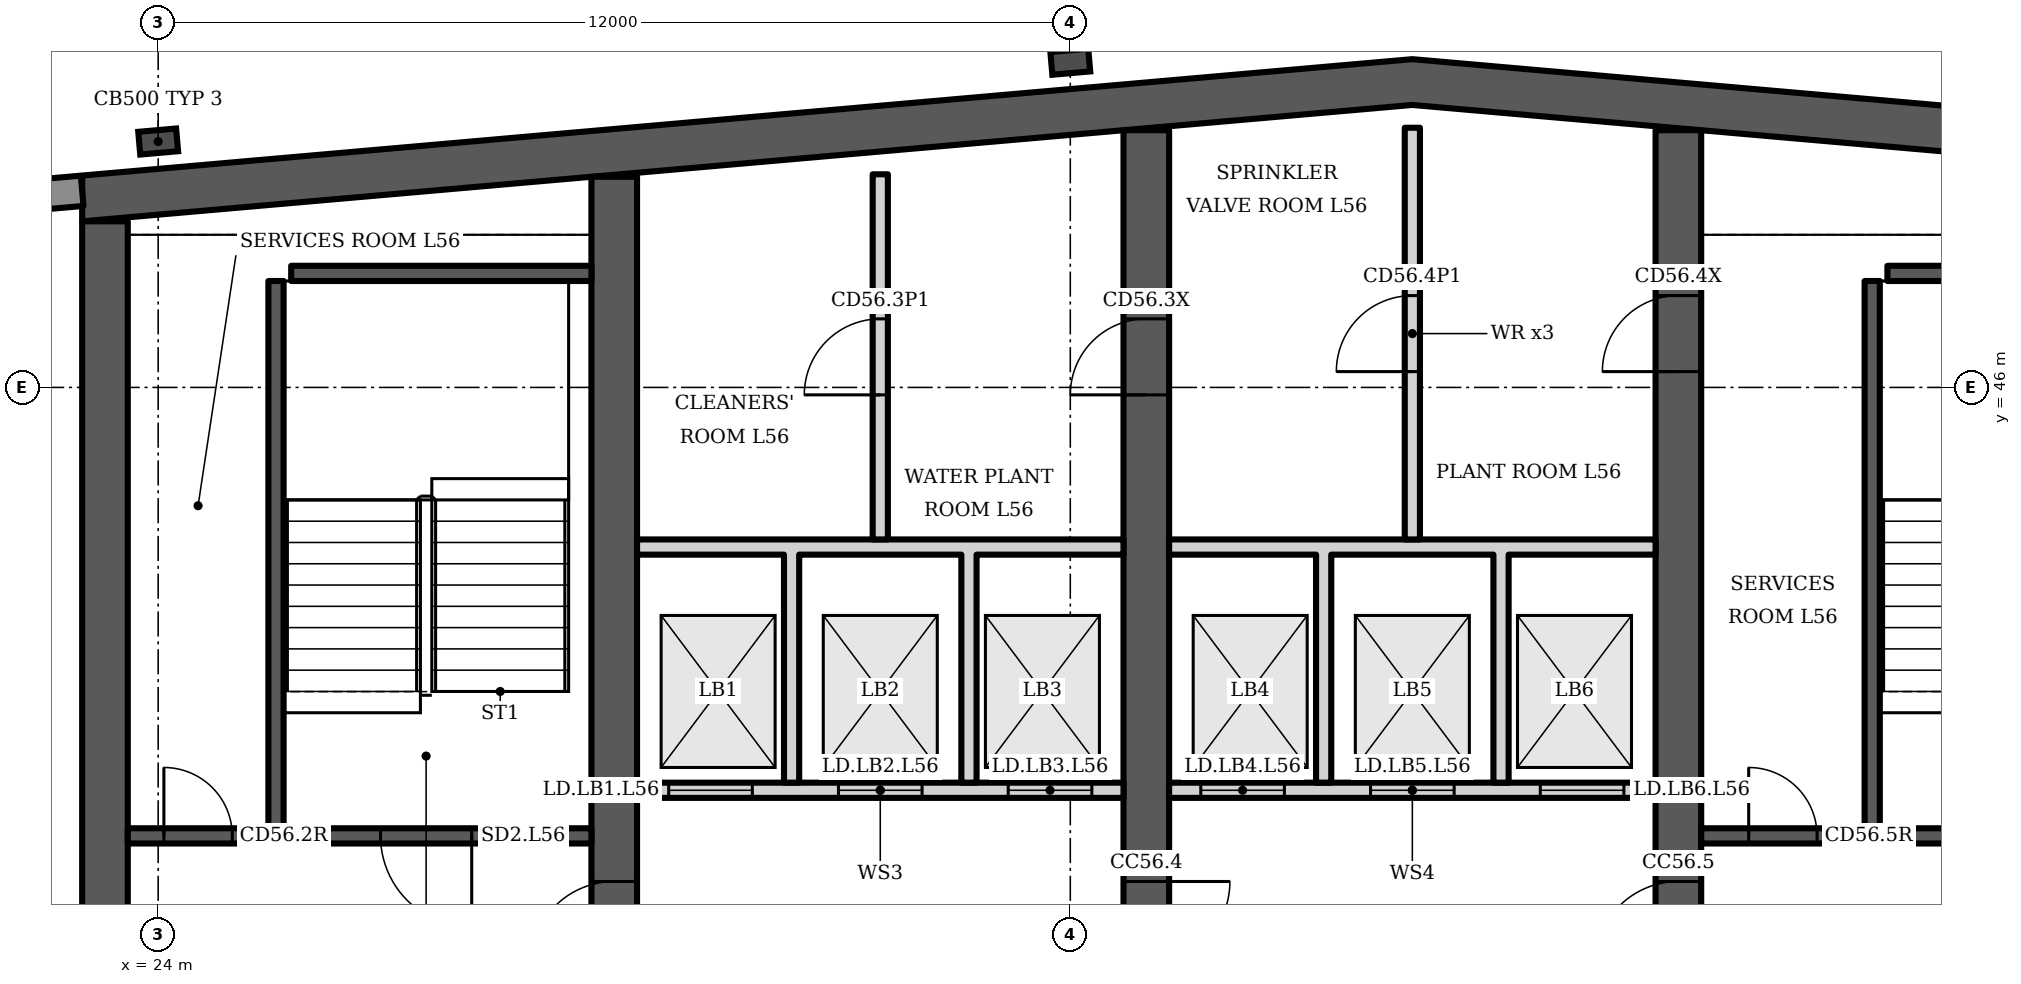
"""IFC4 building model, lengths in metres.
Left out: names, types, materials, properties, quantities, classifications, styles, units other than length and angle.
Written with IfcOpenShell. Run it as: python <this file> out.ifc"""

import sys

from ifc_helpers import new_model, si_unit, direction, frame, frame_2d, origin, origin_2d, place, context, subcontext, project, spatial, polyline, rectangle, i_section, outline, extrude, element, fill, save


model = new_model("IFC4")
c1 = context("Model", 3, precision=1e-05, world=origin(), true_north=direction((0.0, 1.0)))
c2 = subcontext(c1, "Body", "Model", "MODEL_VIEW")
j1 = project(units=[si_unit("LENGTHUNIT", "METRE"), si_unit("PLANEANGLEUNIT", "RADIAN")], contexts=[c1])
p1 = place(None, origin())
s1 = spatial("IfcSite", under=j1, at=p1, CompositionType="ELEMENT")
p2 = place(p1, origin())
s2 = spatial("IfcBuilding", under=s1, at=p2, CompositionType="ELEMENT")
p3 = place(p2, frame((0.0, 0.0, 225.1)))
s3 = spatial("IfcBuildingStorey", under=s2, at=p3, CompositionType="ELEMENT", Elevation=225.1)
p4 = place(p3, frame((0.0, 0.0, -0.0)))
e1 = element("IfcWall", 1, at=p4, inside=s3, PredefinedType="SHEAR", context=c2, shape_type="SweptSolid", body=[
    extrude(outline(polyline([(23.0, 48.185), (40.5, 49.716), (58.0, 48.185), (58.0, 48.787), (40.5, 50.318), (23.0, 48.787), (23.0, 48.185)])), origin(), (0.0, 0.0, 1.0), 3.6),
])
p5 = place(p3, frame((23.3, 34.6, 0.0), z_axis=(0.0, 0.0, 1.0), x_axis=(0.0, 1.0, 0.0)))
e2 = element("IfcWall", 2, at=p5, inside=s3, PredefinedType="SHEAR", context=c2, shape_type="SweptSolid", body=[
    extrude(rectangle(XDim=13.585, YDim=0.6, at=frame_2d((6.792, 0.0))), origin(), (0.0, 0.0, 1.0), 3.6),
])
p6 = place(p3, frame((30.0, 34.6, 0.0), z_axis=(0.0, 0.0, 1.0), x_axis=(0.0, 1.0, 0.0)))
e3 = element("IfcWall", 3, at=p6, inside=s3, PredefinedType="SHEAR", context=c2, shape_type="SweptSolid", body=[
    extrude(rectangle(XDim=14.171, YDim=0.6, at=frame_2d((7.085, 0.0))), origin(), (0.0, 0.0, 1.0), 3.6),
])
p7 = place(p6, frame((3.8, 0.0, 0.0)))
e4 = element("IfcOpeningElement", 4, at=p7, cuts=e3, PredefinedType="OPENING", context=c2, shape_type="SweptSolid", body=[
    extrude(rectangle(XDim=1.1, YDim=2.1, at=frame_2d((0.55, 1.05))), frame((0.0, 0.31, 0.0), z_axis=(0.0, -1.0, 0.0), x_axis=(1.0, 0.0, 0.0)), (0.0, 0.0, 1.0), 0.62),
])
p8 = place(p3, frame((37.0, 34.6, 0.0), z_axis=(0.0, 0.0, 1.0), x_axis=(0.0, 1.0, 0.0)))
e5 = element("IfcWall", 5, at=p8, inside=s3, PredefinedType="SHEAR", context=c2, shape_type="SweptSolid", body=[
    extrude(rectangle(XDim=14.784, YDim=0.6, at=frame_2d((7.392, 0.0))), origin(), (0.0, 0.0, 1.0), 3.6),
])
p9 = place(p8, frame((11.302, 0.0, 0.0)))
e6 = element("IfcOpeningElement", 6, at=p9, cuts=e5, PredefinedType="OPENING", context=c2, shape_type="SweptSolid", body=[
    extrude(rectangle(XDim=1.0, YDim=2.1, at=frame_2d((0.5, 1.05))), frame((0.0, 0.31, 0.0), z_axis=(0.0, -1.0, 0.0), x_axis=(1.0, 0.0, 0.0)), (0.0, 0.0, 1.0), 0.62),
])
p10 = place(p8, frame((3.8, 0.0, 0.0)))
e7 = element("IfcOpeningElement", 7, at=p10, cuts=e5, PredefinedType="OPENING", context=c2, shape_type="SweptSolid", body=[
    extrude(rectangle(XDim=1.1, YDim=2.1, at=frame_2d((0.55, 1.05))), frame((0.0, 0.31, 0.0), z_axis=(0.0, -1.0, 0.0), x_axis=(1.0, 0.0, 0.0)), (0.0, 0.0, 1.0), 0.62),
])
p11 = place(p3, frame((44.0, 34.6, 0.0), z_axis=(0.0, 0.0, 1.0), x_axis=(0.0, 1.0, 0.0)))
e8 = element("IfcWall", 8, at=p11, inside=s3, PredefinedType="SHEAR", context=c2, shape_type="SweptSolid", body=[
    extrude(rectangle(XDim=14.784, YDim=0.6, at=frame_2d((7.392, 0.0))), origin(), (0.0, 0.0, 1.0), 3.6),
])
p12 = place(p11, frame((11.608, 0.0, 0.0)))
e9 = element("IfcOpeningElement", 9, at=p12, cuts=e8, PredefinedType="OPENING", context=c2, shape_type="SweptSolid", body=[
    extrude(rectangle(XDim=1.0, YDim=2.1, at=frame_2d((0.5, 1.05))), frame((0.0, 0.31, 0.0), z_axis=(0.0, -1.0, 0.0), x_axis=(1.0, 0.0, 0.0)), (0.0, 0.0, 1.0), 0.62),
])
p13 = place(p11, frame((3.8, 0.0, 0.0)))
e10 = element("IfcOpeningElement", 10, at=p13, cuts=e8, PredefinedType="OPENING", context=c2, shape_type="SweptSolid", body=[
    extrude(rectangle(XDim=1.1, YDim=2.1, at=frame_2d((0.55, 1.05))), frame((0.0, 0.31, 0.0), z_axis=(0.0, -1.0, 0.0), x_axis=(1.0, 0.0, 0.0)), (0.0, 0.0, 1.0), 0.62),
])
for number, where, z_axis, x_axis in (
    (11, (24.0, 49.235, 0.0), (0.0, 0.0, 1.0), (-0.087, 0.996, 0.0)),
    (12, (36.0, 50.285, 0.0), (0.0, 0.0, 1.0), (-0.087, 0.996, 0.0)),
):
    element("IfcColumn", number, at=place(p3, frame(where, z_axis=z_axis, x_axis=x_axis)), inside=s3, PredefinedType="COLUMN", context=c2, shape_type="SweptSolid", body=[
        extrude(i_section(OverallWidth=0.3, OverallDepth=0.5, WebThickness=0.014, FlangeThickness=0.028, FilletRadius=0.027, at=origin_2d()), origin(), (0.0, 0.0, 1.0), 3.6),
    ])
p14 = place(p3, frame((23.0, 48.587, 0.0), z_axis=(0.0, 0.0, 1.0), x_axis=(-0.996194, -0.087168, 0.0)))
e13 = element("IfcWall", 13, at=p14, inside=s3, PredefinedType="SOLIDWALL", context=c2, shape_type="SweptSolid", body=[
    extrude(rectangle(XDim=2.994, YDim=0.4, at=frame_2d((1.497, 0.0))), origin(), (0.0, 0.0, 1.0), 3.2),
])
p15 = place(p3, frame((23.6, 40.1, 0.0), z_axis=(0.0, 0.0, 1.0), x_axis=(1.0, 0.0, 0.0)))
e14 = element("IfcWall", 14, at=p15, inside=s3, PredefinedType="SHEAR", context=c2, shape_type="SweptSolid", body=[
    extrude(rectangle(XDim=6.1, YDim=0.2, at=frame_2d((3.05, 0.0))), origin(), (0.0, 0.0, 1.0), 3.2),
])
p16 = place(p15, frame((3.325, 0.0, 0.0)))
e15 = element("IfcOpeningElement", 15, at=p16, cuts=e14, PredefinedType="OPENING", context=c2, shape_type="SweptSolid", body=[
    extrude(rectangle(XDim=1.2, YDim=2.1, at=frame_2d((0.6, 1.05))), frame((0.0, 0.11, 0.0), z_axis=(0.0, -1.0, 0.0), x_axis=(1.0, 0.0, 0.0)), (0.0, 0.0, 1.0), 0.22),
])
p17 = place(p15, frame((0.475, 0.0, 0.0)))
e16 = element("IfcOpeningElement", 16, at=p17, cuts=e14, PredefinedType="OPENING", context=c2, shape_type="SweptSolid", body=[
    extrude(rectangle(XDim=0.9, YDim=2.1, at=frame_2d((0.45, 1.05))), frame((0.0, 0.11, 0.0), z_axis=(0.0, -1.0, 0.0), x_axis=(1.0, 0.0, 0.0)), (0.0, 0.0, 1.0), 0.22),
])
p18 = place(p3, frame((25.55, 40.2, 0.0), z_axis=(0.0, 0.0, 1.0), x_axis=(0.0, 1.0, 0.0)))
e17 = element("IfcWall", 17, at=p18, inside=s3, PredefinedType="SHEAR", context=c2, shape_type="SweptSolid", body=[
    extrude(rectangle(XDim=7.2, YDim=0.2, at=frame_2d((3.6, 0.0))), origin(), (0.0, 0.0, 1.0), 3.2),
])
p19 = place(p3, frame((25.75, 47.5, 0.0), z_axis=(0.0, 0.0, 1.0), x_axis=(1.0, 0.0, 0.0)))
e18 = element("IfcWall", 18, at=p19, inside=s3, PredefinedType="SHEAR", context=c2, shape_type="SweptSolid", body=[
    extrude(rectangle(XDim=3.95, YDim=0.2, at=frame_2d((1.975, 0.0))), origin(), (0.0, 0.0, 1.0), 3.2),
])
p20 = place(p3, frame((30.3, 40.7, 0.0), z_axis=(0.0, 0.0, 1.0), x_axis=(1.0, 0.0, 0.0)))
e19 = element("IfcWall", 19, at=p20, inside=s3, PredefinedType="PARTITIONING", context=c2, shape_type="SweptSolid", body=[
    extrude(rectangle(XDim=6.4, YDim=0.2, at=frame_2d((3.2, 0.0))), origin(), (0.0, 0.0, 1.0), 3.2),
])
p21 = place(p20, frame((0.417, 0.0, 0.0)))
e20 = element("IfcOpeningElement", 20, at=p21, cuts=e19, PredefinedType="OPENING", context=c2, shape_type="SweptSolid", body=[
    extrude(rectangle(XDim=1.1, YDim=2.1, at=frame_2d((0.55, 1.05))), frame((0.0, 0.11, 0.0), z_axis=(0.0, -1.0, 0.0), x_axis=(1.0, 0.0, 0.0)), (0.0, 0.0, 1.0), 0.22),
])
p22 = place(p20, frame((2.65, 0.0, 0.0)))
e21 = element("IfcOpeningElement", 21, at=p22, cuts=e19, PredefinedType="OPENING", context=c2, shape_type="SweptSolid", body=[
    extrude(rectangle(XDim=1.1, YDim=2.1, at=frame_2d((0.55, 1.05))), frame((0.0, 0.11, 0.0), z_axis=(0.0, -1.0, 0.0), x_axis=(1.0, 0.0, 0.0)), (0.0, 0.0, 1.0), 0.22),
])
p23 = place(p20, frame((4.883, 0.0, 0.0)))
e22 = element("IfcOpeningElement", 22, at=p23, cuts=e19, PredefinedType="OPENING", context=c2, shape_type="SweptSolid", body=[
    extrude(rectangle(XDim=1.1, YDim=2.1, at=frame_2d((0.55, 1.05))), frame((0.0, 0.11, 0.0), z_axis=(0.0, -1.0, 0.0), x_axis=(1.0, 0.0, 0.0)), (0.0, 0.0, 1.0), 0.22),
])
p24 = place(p3, frame((0.0, 0.0, -0.0)))
e23 = element("IfcWall", 23, at=p24, inside=s3, PredefinedType="PARTITIONING", context=c2, shape_type="SweptSolid", body=[
    extrude(outline(polyline([(32.433, 40.8), (32.233, 40.8), (32.233, 43.8), (30.3, 43.8), (30.3, 44.0), (36.7, 44.0), (36.7, 43.8), (34.767, 43.8), (34.767, 40.8), (34.567, 40.8), (34.567, 43.8), (32.433, 43.8), (32.433, 40.8)])), origin(), (0.0, 0.0, 1.0), 3.2),
])
p25 = place(p3, frame((33.5, 44.0, 0.0), z_axis=(0.0, 0.0, 1.0), x_axis=(0.0, 1.0, 0.0)))
e24 = element("IfcWall", 24, at=p25, inside=s3, PredefinedType="PARTITIONING", context=c2, shape_type="SweptSolid", body=[
    extrude(rectangle(XDim=4.804, YDim=0.2, at=frame_2d((2.402, 0.0))), origin(), (0.0, 0.0, 1.0), 3.2),
])
p26 = place(p25, frame((1.902, 0.0, 0.0)))
e25 = element("IfcOpeningElement", 25, at=p26, cuts=e24, PredefinedType="OPENING", context=c2, shape_type="SweptSolid", body=[
    extrude(rectangle(XDim=1.0, YDim=2.1, at=frame_2d((0.5, 1.05))), frame((0.0, 0.11, 0.0), z_axis=(0.0, -1.0, 0.0), x_axis=(1.0, 0.0, 0.0)), (0.0, 0.0, 1.0), 0.22),
])
p27 = place(p3, frame((37.3, 40.7, 0.0), z_axis=(0.0, 0.0, 1.0), x_axis=(1.0, 0.0, 0.0)))
e26 = element("IfcWall", 26, at=p27, inside=s3, PredefinedType="PARTITIONING", context=c2, shape_type="SweptSolid", body=[
    extrude(rectangle(XDim=6.4, YDim=0.2, at=frame_2d((3.2, 0.0))), origin(), (0.0, 0.0, 1.0), 3.2),
])
p28 = place(p27, frame((0.417, 0.0, 0.0)))
e27 = element("IfcOpeningElement", 27, at=p28, cuts=e26, PredefinedType="OPENING", context=c2, shape_type="SweptSolid", body=[
    extrude(rectangle(XDim=1.1, YDim=2.1, at=frame_2d((0.55, 1.05))), frame((0.0, 0.11, 0.0), z_axis=(0.0, -1.0, 0.0), x_axis=(1.0, 0.0, 0.0)), (0.0, 0.0, 1.0), 0.22),
])
p29 = place(p27, frame((2.65, 0.0, 0.0)))
e28 = element("IfcOpeningElement", 28, at=p29, cuts=e26, PredefinedType="OPENING", context=c2, shape_type="SweptSolid", body=[
    extrude(rectangle(XDim=1.1, YDim=2.1, at=frame_2d((0.55, 1.05))), frame((0.0, 0.11, 0.0), z_axis=(0.0, -1.0, 0.0), x_axis=(1.0, 0.0, 0.0)), (0.0, 0.0, 1.0), 0.22),
])
p30 = place(p27, frame((4.883, 0.0, 0.0)))
e29 = element("IfcOpeningElement", 29, at=p30, cuts=e26, PredefinedType="OPENING", context=c2, shape_type="SweptSolid", body=[
    extrude(rectangle(XDim=1.1, YDim=2.1, at=frame_2d((0.55, 1.05))), frame((0.0, 0.11, 0.0), z_axis=(0.0, -1.0, 0.0), x_axis=(1.0, 0.0, 0.0)), (0.0, 0.0, 1.0), 0.22),
])
p31 = place(p3, frame((0.0, 0.0, -0.0)))
e30 = element("IfcWall", 30, at=p31, inside=s3, PredefinedType="PARTITIONING", context=c2, shape_type="SweptSolid", body=[
    extrude(outline(polyline([(39.433, 40.8), (39.233, 40.8), (39.233, 43.8), (37.3, 43.8), (37.3, 44.0), (43.7, 44.0), (43.7, 43.8), (41.767, 43.8), (41.767, 40.8), (41.567, 40.8), (41.567, 43.8), (39.433, 43.8), (39.433, 40.8)])), origin(), (0.0, 0.0, 1.0), 3.2),
])
p32 = place(p3, frame((40.5, 44.0, 0.0), z_axis=(0.0, 0.0, 1.0), x_axis=(0.0, 1.0, 0.0)))
e31 = element("IfcWall", 31, at=p32, inside=s3, PredefinedType="PARTITIONING", context=c2, shape_type="SweptSolid", body=[
    extrude(rectangle(XDim=5.416, YDim=0.2, at=frame_2d((2.708, 0.0))), origin(), (0.0, 0.0, 1.0), 3.2),
])
p33 = place(p32, frame((2.208, 0.0, 0.0)))
e32 = element("IfcOpeningElement", 32, at=p33, cuts=e31, PredefinedType="OPENING", context=c2, shape_type="SweptSolid", body=[
    extrude(rectangle(XDim=1.0, YDim=2.1, at=frame_2d((0.5, 1.05))), frame((0.0, 0.11, 0.0), z_axis=(0.0, -1.0, 0.0), x_axis=(1.0, 0.0, 0.0)), (0.0, 0.0, 1.0), 0.22),
])
p34 = place(p3, frame((44.3, 40.1, 0.0), z_axis=(0.0, 0.0, 1.0), x_axis=(1.0, 0.0, 0.0)))
e33 = element("IfcWall", 33, at=p34, inside=s3, PredefinedType="SHEAR", context=c2, shape_type="SweptSolid", body=[
    extrude(rectangle(XDim=6.4, YDim=0.2, at=frame_2d((3.2, 0.0))), origin(), (0.0, 0.0, 1.0), 3.2),
])
p35 = place(p34, frame((3.625, 0.0, 0.0)))
e34 = element("IfcOpeningElement", 34, at=p35, cuts=e33, PredefinedType="OPENING", context=c2, shape_type="SweptSolid", body=[
    extrude(rectangle(XDim=1.2, YDim=2.1, at=frame_2d((0.6, 1.05))), frame((0.0, 0.11, 0.0), z_axis=(0.0, -1.0, 0.0), x_axis=(1.0, 0.0, 0.0)), (0.0, 0.0, 1.0), 0.22),
])
p36 = place(p34, frame((0.625, 0.0, 0.0)))
e35 = element("IfcOpeningElement", 35, at=p36, cuts=e33, PredefinedType="OPENING", context=c2, shape_type="SweptSolid", body=[
    extrude(rectangle(XDim=0.9, YDim=2.1, at=frame_2d((0.45, 1.05))), frame((0.0, 0.11, 0.0), z_axis=(0.0, -1.0, 0.0), x_axis=(1.0, 0.0, 0.0)), (0.0, 0.0, 1.0), 0.22),
])
p37 = place(p3, frame((46.55, 40.2, 0.0), z_axis=(0.0, 0.0, 1.0), x_axis=(0.0, 1.0, 0.0)))
e36 = element("IfcWall", 36, at=p37, inside=s3, PredefinedType="SHEAR", context=c2, shape_type="SweptSolid", body=[
    extrude(rectangle(XDim=7.2, YDim=0.2, at=frame_2d((3.6, 0.0))), origin(), (0.0, 0.0, 1.0), 3.2),
])
p38 = place(p3, frame((46.75, 47.5, 0.0), z_axis=(0.0, 0.0, 1.0), x_axis=(1.0, 0.0, 0.0)))
e37 = element("IfcWall", 37, at=p38, inside=s3, PredefinedType="SHEAR", context=c2, shape_type="SweptSolid", body=[
    extrude(rectangle(XDim=3.95, YDim=0.2, at=frame_2d((1.975, 0.0))), origin(), (0.0, 0.0, 1.0), 3.2),
])
p39 = place(p16, origin())
e38 = element("IfcDoor", 38, at=p39, inside=s3, OperationType="SINGLE_SWING_RIGHT", PredefinedType="DOOR", context=c2, shape_type="SweptSolid", body=[
    extrude(rectangle(XDim=1.2, YDim=2.1, at=frame_2d((0.6, 1.05))), frame((0.0, 0.025, 0.0), z_axis=(0.0, -1.0, 0.0), x_axis=(1.0, 0.0, 0.0)), (0.0, 0.0, 1.0), 0.05),
])
fill(e15, e38)
p40 = place(p17, origin())
e39 = element("IfcDoor", 39, at=p40, inside=s3, OperationType="SINGLE_SWING_LEFT", PredefinedType="DOOR", context=c2, shape_type="SweptSolid", body=[
    extrude(rectangle(XDim=0.9, YDim=2.1, at=frame_2d((0.45, 1.05))), frame((0.0, 0.025, 0.0), z_axis=(0.0, -1.0, 0.0), x_axis=(1.0, 0.0, 0.0)), (0.0, 0.0, 1.0), 0.05),
])
fill(e16, e39)
p41 = place(p21, origin())
e40 = element("IfcDoor", 40, at=p41, inside=s3, OperationType="DOUBLE_DOOR_SLIDING", PredefinedType="DOOR", context=c2, shape_type="SweptSolid", body=[
    extrude(rectangle(XDim=1.1, YDim=2.1, at=frame_2d((0.55, 1.05))), frame((0.0, 0.025, 0.0), z_axis=(0.0, -1.0, 0.0), x_axis=(1.0, 0.0, 0.0)), (0.0, 0.0, 1.0), 0.05),
])
fill(e20, e40)
p42 = place(p22, origin())
e41 = element("IfcDoor", 41, at=p42, inside=s3, OperationType="DOUBLE_DOOR_SLIDING", PredefinedType="DOOR", context=c2, shape_type="SweptSolid", body=[
    extrude(rectangle(XDim=1.1, YDim=2.1, at=frame_2d((0.55, 1.05))), frame((0.0, 0.025, 0.0), z_axis=(0.0, -1.0, 0.0), x_axis=(1.0, 0.0, 0.0)), (0.0, 0.0, 1.0), 0.05),
])
fill(e21, e41)
p43 = place(p23, origin())
e42 = element("IfcDoor", 42, at=p43, inside=s3, OperationType="DOUBLE_DOOR_SLIDING", PredefinedType="DOOR", context=c2, shape_type="SweptSolid", body=[
    extrude(rectangle(XDim=1.1, YDim=2.1, at=frame_2d((0.55, 1.05))), frame((0.0, 0.025, 0.0), z_axis=(0.0, -1.0, 0.0), x_axis=(1.0, 0.0, 0.0)), (0.0, 0.0, 1.0), 0.05),
])
fill(e22, e42)
p44 = place(p26, origin())
e43 = element("IfcDoor", 43, at=p44, inside=s3, OperationType="SINGLE_SWING_LEFT", PredefinedType="DOOR", context=c2, shape_type="SweptSolid", body=[
    extrude(rectangle(XDim=1.0, YDim=2.1, at=frame_2d((0.5, 1.05))), frame((0.0, 0.025, 0.0), z_axis=(0.0, -1.0, 0.0), x_axis=(1.0, 0.0, 0.0)), (0.0, 0.0, 1.0), 0.05),
])
fill(e25, e43)
p45 = place(p9, origin())
e44 = element("IfcDoor", 44, at=p45, inside=s3, OperationType="SINGLE_SWING_LEFT", PredefinedType="DOOR", context=c2, shape_type="SweptSolid", body=[
    extrude(rectangle(XDim=1.0, YDim=2.1, at=frame_2d((0.5, 1.05))), frame((0.0, 0.025, 0.0), z_axis=(0.0, -1.0, 0.0), x_axis=(1.0, 0.0, 0.0)), (0.0, 0.0, 1.0), 0.05),
])
fill(e6, e44)
p46 = place(p28, origin())
e45 = element("IfcDoor", 45, at=p46, inside=s3, OperationType="DOUBLE_DOOR_SLIDING", PredefinedType="DOOR", context=c2, shape_type="SweptSolid", body=[
    extrude(rectangle(XDim=1.1, YDim=2.1, at=frame_2d((0.55, 1.05))), frame((0.0, 0.025, 0.0), z_axis=(0.0, -1.0, 0.0), x_axis=(1.0, 0.0, 0.0)), (0.0, 0.0, 1.0), 0.05),
])
fill(e27, e45)
p47 = place(p29, origin())
e46 = element("IfcDoor", 46, at=p47, inside=s3, OperationType="DOUBLE_DOOR_SLIDING", PredefinedType="DOOR", context=c2, shape_type="SweptSolid", body=[
    extrude(rectangle(XDim=1.1, YDim=2.1, at=frame_2d((0.55, 1.05))), frame((0.0, 0.025, 0.0), z_axis=(0.0, -1.0, 0.0), x_axis=(1.0, 0.0, 0.0)), (0.0, 0.0, 1.0), 0.05),
])
fill(e28, e46)
p48 = place(p30, origin())
e47 = element("IfcDoor", 47, at=p48, inside=s3, OperationType="DOUBLE_DOOR_SLIDING", PredefinedType="DOOR", context=c2, shape_type="SweptSolid", body=[
    extrude(rectangle(XDim=1.1, YDim=2.1, at=frame_2d((0.55, 1.05))), frame((0.0, 0.025, 0.0), z_axis=(0.0, -1.0, 0.0), x_axis=(1.0, 0.0, 0.0)), (0.0, 0.0, 1.0), 0.05),
])
fill(e29, e47)
p49 = place(p33, origin())
e48 = element("IfcDoor", 48, at=p49, inside=s3, OperationType="SINGLE_SWING_LEFT", PredefinedType="DOOR", context=c2, shape_type="SweptSolid", body=[
    extrude(rectangle(XDim=1.0, YDim=2.1, at=frame_2d((0.5, 1.05))), frame((0.0, 0.025, 0.0), z_axis=(0.0, -1.0, 0.0), x_axis=(1.0, 0.0, 0.0)), (0.0, 0.0, 1.0), 0.05),
])
fill(e32, e48)
p50 = place(p12, origin())
e49 = element("IfcDoor", 49, at=p50, inside=s3, OperationType="SINGLE_SWING_LEFT", PredefinedType="DOOR", context=c2, shape_type="SweptSolid", body=[
    extrude(rectangle(XDim=1.0, YDim=2.1, at=frame_2d((0.5, 1.05))), frame((0.0, 0.025, 0.0), z_axis=(0.0, -1.0, 0.0), x_axis=(1.0, 0.0, 0.0)), (0.0, 0.0, 1.0), 0.05),
])
fill(e9, e49)
p51 = place(p36, origin())
e50 = element("IfcDoor", 50, at=p51, inside=s3, OperationType="SINGLE_SWING_LEFT", PredefinedType="DOOR", context=c2, shape_type="SweptSolid", body=[
    extrude(rectangle(XDim=0.9, YDim=2.1, at=frame_2d((0.45, 1.05))), frame((0.0, 0.025, 0.0), z_axis=(0.0, -1.0, 0.0), x_axis=(1.0, 0.0, 0.0)), (0.0, 0.0, 1.0), 0.05),
])
fill(e35, e50)
p52 = place(p7, origin())
e51 = element("IfcDoor", 51, at=p52, inside=s3, OperationType="SINGLE_SWING_LEFT", PredefinedType="DOOR", context=c2, shape_type="SweptSolid", body=[
    extrude(rectangle(XDim=1.1, YDim=2.1, at=frame_2d((0.55, 1.05))), frame((0.0, 0.025, 0.0), z_axis=(0.0, -1.0, 0.0), x_axis=(1.0, 0.0, 0.0)), (0.0, 0.0, 1.0), 0.05),
])
fill(e4, e51)
p53 = place(p10, origin())
e52 = element("IfcDoor", 52, at=p53, inside=s3, OperationType="SINGLE_SWING_RIGHT", PredefinedType="DOOR", context=c2, shape_type="SweptSolid", body=[
    extrude(rectangle(XDim=1.1, YDim=2.1, at=frame_2d((0.55, 1.05))), frame((0.0, 0.025, 0.0), z_axis=(0.0, -1.0, 0.0), x_axis=(1.0, 0.0, 0.0)), (0.0, 0.0, 1.0), 0.05),
])
fill(e7, e52)
p54 = place(p13, origin())
e53 = element("IfcDoor", 53, at=p54, inside=s3, OperationType="SINGLE_SWING_LEFT", PredefinedType="DOOR", context=c2, shape_type="SweptSolid", body=[
    extrude(rectangle(XDim=1.1, YDim=2.1, at=frame_2d((0.55, 1.05))), frame((0.0, 0.025, 0.0), z_axis=(0.0, -1.0, 0.0), x_axis=(1.0, 0.0, 0.0)), (0.0, 0.0, 1.0), 0.05),
])
fill(e10, e53)
save(model, sys.argv[1])
